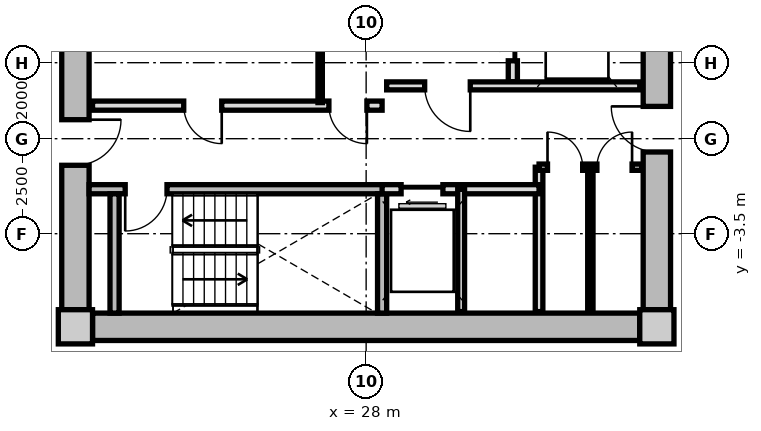
"""IFC4 building model, lengths in metres.
Left out: names, types, materials, properties, quantities, classifications, styles, units other than length and angle.
Written with IfcOpenShell. Run it as: python <this file> out.ifc"""

import sys

from ifc_helpers import new_model, si_unit, direction, frame, frame_2d, origin, origin_2d, place, context, subcontext, project, spatial, rectangle, extrude, source, transform, mapped, element, fill, save


model = new_model("IFC4")
c1 = context("Model", 3, precision=1e-05, world=origin(), true_north=direction((0.0, 1.0)))
c2 = subcontext(c1, "Body", "Model", "MODEL_VIEW")
j1 = project(units=[si_unit("LENGTHUNIT", "METRE"), si_unit("PLANEANGLEUNIT", "RADIAN")], contexts=[c1])
p1 = place(None, origin())
s1 = spatial("IfcSite", under=j1, at=p1, CompositionType="ELEMENT")
p2 = place(p1, origin())
s2 = spatial("IfcBuilding", under=s1, at=p2, CompositionType="ELEMENT")
p3 = place(p2, frame((0.0, 0.0, 105.4)))
s3 = spatial("IfcBuildingStorey", under=s2, at=p3, CompositionType="ELEMENT", Elevation=105.4)
m1 = source(origin(), c2, "Body", "SweptSolid", [
    extrude(rectangle(XDim=0.9, YDim=0.9, at=origin_2d()), origin(), (0.0, 0.0, 1.0), 3.05),
])
for number, where, z_axis, x_axis in (
    (1, (20.35, -5.95, 0.0), (0.0, 0.0, 1.0), (1.0, 0.0, 0.0)),
    (2, (35.65, -5.95, 0.0), (0.0, 0.0, 1.0), (1.0, 0.0, 0.0)),
):
    element("IfcColumn", number, at=place(p3, frame(where, z_axis=z_axis, x_axis=x_axis)), inside=s3, PredefinedType="COLUMN", context=c2, shape_type="MappedRepresentation", body=[
        mapped(m1, transform((0.0, 0.0, 0.0), x_axis=(1.0, 0.0, 0.0), y_axis=(0.0, 1.0, 0.0), z_axis=(0.0, 0.0, 1.0), scale=1.0)),
    ])
m2 = source(origin(), c2, "Body", "SweptSolid", [
    extrude(rectangle(XDim=14.4, YDim=0.72, at=frame_2d((7.2, 0.0))), origin(), (0.0, 0.0, 1.0), 2.79),
])
p4 = place(p3, frame((35.2, -5.95, 0.0), z_axis=(0.0, 0.0, 1.0), x_axis=(-1.0, 0.0, 0.0)))
e3 = element("IfcWall", 3, at=p4, inside=s3, PredefinedType="SHEAR", context=c2, shape_type="MappedRepresentation", body=[
    mapped(m2, transform((0.0, 0.0, 0.0), x_axis=(1.0, 0.0, 0.0), y_axis=(0.0, 1.0, 0.0), z_axis=(0.0, 0.0, 1.0), scale=1.0)),
])
m3 = source(origin(), c2, "Body", "SweptSolid", [
    extrude(rectangle(XDim=11.0, YDim=0.72, at=frame_2d((5.5, 0.0))), origin(), (0.0, 0.0, 1.0), 2.79),
])
p5 = place(p3, frame((20.35, -5.5, 0.0), z_axis=(0.0, 0.0, 1.0), x_axis=(0.0, 1.0, 0.0)))
e4 = element("IfcWall", 4, at=p5, inside=s3, PredefinedType="SHEAR", context=c2, shape_type="MappedRepresentation", body=[
    mapped(m3, transform((0.0, 0.0, 0.0), x_axis=(1.0, 0.0, 0.0), y_axis=(0.0, 1.0, 0.0), z_axis=(0.0, 0.0, 1.0), scale=1.0)),
])
p6 = place(p5, frame((3.8, 0.0, 0.0)))
e5 = element("IfcOpeningElement", 5, at=p6, cuts=e4, PredefinedType="OPENING", context=c2, shape_type="SweptSolid", body=[
    extrude(rectangle(XDim=1.2, YDim=2.15, at=frame_2d((0.6, 1.075))), frame((0.0, 0.37, 0.0), z_axis=(0.0, -1.0, 0.0), x_axis=(1.0, 0.0, 0.0)), (0.0, 0.0, 1.0), 0.74),
])
p7 = place(p3, frame((35.65, 5.5, 0.0), z_axis=(0.0, 0.0, 1.0), x_axis=(0.0, -1.0, 0.0)))
e6 = element("IfcWall", 6, at=p7, inside=s3, PredefinedType="SHEAR", context=c2, shape_type="MappedRepresentation", body=[
    mapped(m3, transform((0.0, 0.0, 0.0), x_axis=(1.0, 0.0, 0.0), y_axis=(0.0, 1.0, 0.0), z_axis=(0.0, 0.0, 1.0), scale=1.0)),
])
p8 = place(p7, frame((5.65, 0.0, 0.0)))
e7 = element("IfcOpeningElement", 7, at=p8, cuts=e6, PredefinedType="OPENING", context=c2, shape_type="SweptSolid", body=[
    extrude(rectangle(XDim=1.2, YDim=2.15, at=frame_2d((0.6, 1.075))), frame((0.0, 0.37, 0.0), z_axis=(0.0, -1.0, 0.0), x_axis=(1.0, 0.0, 0.0)), (0.0, 0.0, 1.0), 0.74),
])
m4 = source(origin(), c2, "Body", "SweptSolid", [
    extrude(rectangle(XDim=7.83, YDim=0.24, at=frame_2d((3.915, 0.0))), origin(), (0.0, 0.0, 1.0), 2.79),
])
p9 = place(p3, frame((20.71, -2.33, 0.0), z_axis=(0.0, 0.0, 1.0), x_axis=(1.0, 0.0, 0.0)))
e8 = element("IfcWall", 8, at=p9, inside=s3, PredefinedType="PARTITIONING", context=c2, shape_type="MappedRepresentation", body=[
    mapped(m4, transform((0.0, 0.0, 0.0), x_axis=(1.0, 0.0, 0.0), y_axis=(0.0, 1.0, 0.0), z_axis=(0.0, 0.0, 1.0), scale=1.0)),
])
p10 = place(p9, frame((0.95, 0.0, 0.0)))
e9 = element("IfcOpeningElement", 9, at=p10, cuts=e8, PredefinedType="OPENING", context=c2, shape_type="SweptSolid", body=[
    extrude(rectangle(XDim=1.1, YDim=2.15, at=frame_2d((0.55, 1.075))), frame((0.0, 0.13, 0.0), z_axis=(0.0, -1.0, 0.0), x_axis=(1.0, 0.0, 0.0)), (0.0, 0.0, 1.0), 0.26),
])
m5 = source(origin(), c2, "Body", "SweptSolid", [
    extrude(rectangle(XDim=3.14, YDim=0.24, at=frame_2d((1.57, 0.0))), origin(), (0.0, 0.0, 1.0), 2.79),
])
for number, where, z_axis, x_axis in (
    (10, (21.38, -5.59, 0.0), (0.0, 0.0, 1.0), (0.0, 1.0, 0.0)),
    (11, (28.42, -5.59, 0.0), (0.0, 0.0, 1.0), (0.0, 1.0, 0.0)),
):
    element("IfcWall", number, at=place(p3, frame(where, z_axis=z_axis, x_axis=x_axis)), inside=s3, PredefinedType="PARTITIONING", context=c2, shape_type="MappedRepresentation", body=[
        mapped(m5, transform((0.0, 0.0, 0.0), x_axis=(1.0, 0.0, 0.0), y_axis=(0.0, 1.0, 0.0), z_axis=(0.0, 0.0, 1.0), scale=1.0)),
    ])
m6 = source(origin(), c2, "Body", "SweptSolid", [
    extrude(rectangle(XDim=5.0, YDim=0.24, at=frame_2d((2.5, 0.0))), origin(), (0.0, 0.0, 1.0), 2.775),
])
p11 = place(p3, frame((31.86, 0.5, 0.0), z_axis=(0.0, 0.0, 1.0), x_axis=(0.0, 1.0, 0.0)))
e12 = element("IfcWall", 12, at=p11, inside=s3, PredefinedType="PARTITIONING", context=c2, shape_type="MappedRepresentation", body=[
    mapped(m6, transform((0.0, 0.0, 0.0), x_axis=(1.0, 0.0, 0.0), y_axis=(0.0, 1.0, 0.0), z_axis=(0.0, 0.0, 1.0), scale=1.0)),
])
p12 = place(p11, frame((3.05, 0.0, 0.0)))
e13 = element("IfcOpeningElement", 13, at=p12, cuts=e12, PredefinedType="OPENING", context=c2, shape_type="SweptSolid", body=[
    extrude(rectangle(XDim=1.3, YDim=2.2, at=frame_2d((0.65, 1.1))), frame((0.0, 0.13, 0.0), z_axis=(0.0, -1.0, 0.0), x_axis=(1.0, 0.0, 0.0)), (0.0, 0.0, 1.0), 0.26),
])
p13 = place(p11, frame((0.55, 0.0, 0.0)))
e14 = element("IfcOpeningElement", 14, at=p13, cuts=e12, PredefinedType="OPENING", context=c2, shape_type="SweptSolid", body=[
    extrude(rectangle(XDim=1.3, YDim=2.2, at=frame_2d((0.65, 1.1))), frame((0.0, 0.13, 0.0), z_axis=(0.0, -1.0, 0.0), x_axis=(1.0, 0.0, 0.0)), (0.0, 0.0, 1.0), 0.26),
])
m7 = source(origin(), c2, "Body", "SweptSolid", [
    extrude(rectangle(XDim=6.66, YDim=0.21, at=frame_2d((3.33, 0.0))), origin(), (0.0, 0.0, 1.0), 2.775),
])
p14 = place(p3, frame((28.54, 0.39, 0.0), z_axis=(0.0, 0.0, 1.0), x_axis=(1.0, 0.0, 0.0)))
e15 = element("IfcWall", 15, at=p14, inside=s3, PredefinedType="PARTITIONING", context=c2, shape_type="MappedRepresentation", body=[
    mapped(m7, transform((0.0, 0.0, 0.0), x_axis=(1.0, 0.0, 0.0), y_axis=(0.0, 1.0, 0.0), z_axis=(0.0, 0.0, 1.0), scale=1.0)),
])
p15 = place(p14, frame((1.0, 0.0, 0.0)))
e16 = element("IfcOpeningElement", 16, at=p15, cuts=e15, PredefinedType="OPENING", context=c2, shape_type="SweptSolid", body=[
    extrude(rectangle(XDim=1.2, YDim=2.15, at=frame_2d((0.6, 1.075))), frame((0.0, 0.115, 0.0), z_axis=(0.0, -1.0, 0.0), x_axis=(1.0, 0.0, 0.0)), (0.0, 0.0, 1.0), 0.23),
])
m8 = source(origin(), c2, "Body", "SweptSolid", [
    extrude(rectangle(XDim=7.62, YDim=0.24, at=frame_2d((3.81, 0.0))), origin(), (0.0, 0.0, 1.0), 2.775),
])
p16 = place(p3, frame((20.8, -0.13, 0.0), z_axis=(0.0, 0.0, 1.0), x_axis=(1.0, 0.0, 0.0)))
e17 = element("IfcWall", 17, at=p16, inside=s3, PredefinedType="PARTITIONING", context=c2, shape_type="MappedRepresentation", body=[
    mapped(m8, transform((0.0, 0.0, 0.0), x_axis=(1.0, 0.0, 0.0), y_axis=(0.0, 1.0, 0.0), z_axis=(0.0, 0.0, 1.0), scale=1.0)),
])
p17 = place(p16, frame((6.22, 0.0, 0.0)))
e18 = element("IfcOpeningElement", 18, at=p17, cuts=e17, PredefinedType="OPENING", context=c2, shape_type="SweptSolid", body=[
    extrude(rectangle(XDim=1.0, YDim=2.1, at=frame_2d((0.5, 1.05))), frame((0.0, 0.13, 0.0), z_axis=(0.0, -1.0, 0.0), x_axis=(1.0, 0.0, 0.0)), (0.0, 0.0, 1.0), 0.26),
])
p18 = place(p16, frame((2.4, 0.0, 0.0)))
e19 = element("IfcOpeningElement", 19, at=p18, cuts=e17, PredefinedType="OPENING", context=c2, shape_type="SweptSolid", body=[
    extrude(rectangle(XDim=1.0, YDim=2.1, at=frame_2d((0.5, 1.05))), frame((0.0, 0.13, 0.0), z_axis=(0.0, -1.0, 0.0), x_axis=(1.0, 0.0, 0.0)), (0.0, 0.0, 1.0), 0.26),
])
m9 = source(origin(), c2, "Body", "SweptSolid", [
    extrude(rectangle(XDim=2.33, YDim=0.115, at=frame_2d((1.165, 0.0))), origin(), (0.0, 0.0, 1.0), 2.775),
])
p19 = place(p3, frame((26.79, -0.05, 0.0), z_axis=(0.0, 0.0, 1.0), x_axis=(0.0, 1.0, 0.0)))
e20 = element("IfcWall", 20, at=p19, inside=s3, PredefinedType="PARTITIONING", context=c2, shape_type="MappedRepresentation", body=[
    mapped(m9, transform((0.0, 0.0, 0.0), x_axis=(1.0, 0.0, 0.0), y_axis=(0.0, 1.0, 0.0), z_axis=(0.0, 0.0, 1.0), scale=1.0)),
])
m10 = source(origin(), c2, "Body", "SweptSolid", [
    extrude(rectangle(XDim=3.8, YDim=0.2, at=frame_2d((1.9, 0.0))), origin(), (0.0, 0.0, 1.0), 2.775),
])
p20 = place(p3, frame((32.55, -5.55, 0.0), z_axis=(0.0, 0.0, 1.0), x_axis=(0.0, 1.0, 0.0)))
e21 = element("IfcWall", 21, at=p20, inside=s3, PredefinedType="PARTITIONING", context=c2, shape_type="MappedRepresentation", body=[
    mapped(m10, transform((0.0, 0.0, 0.0), x_axis=(1.0, 0.0, 0.0), y_axis=(0.0, 1.0, 0.0), z_axis=(0.0, 0.0, 1.0), scale=1.0)),
])
m11 = source(origin(), c2, "Body", "SweptSolid", [
    extrude(rectangle(XDim=4.13, YDim=0.24, at=frame_2d((2.065, 0.0))), origin(), (0.0, 0.0, 1.0), 2.775),
])
p21 = place(p3, frame((28.42, -2.33, 0.0), z_axis=(0.0, 0.0, 1.0), x_axis=(1.0, 0.0, 0.0)))
e22 = element("IfcWall", 22, at=p21, inside=s3, PredefinedType="PARTITIONING", context=c2, shape_type="MappedRepresentation", body=[
    mapped(m11, transform((0.0, 0.0, 0.0), x_axis=(1.0, 0.0, 0.0), y_axis=(0.0, 1.0, 0.0), z_axis=(0.0, 0.0, 1.0), scale=1.0)),
])
p22 = place(p21, frame((0.5, 0.0, 0.0)))
e23 = element("IfcOpeningElement", 23, at=p22, cuts=e22, PredefinedType="OPENING", context=c2, shape_type="SweptSolid", body=[
    extrude(rectangle(XDim=1.1, YDim=2.2, at=frame_2d((0.55, 1.1))), frame((0.0, 0.13, 0.0), z_axis=(0.0, -1.0, 0.0), x_axis=(1.0, 0.0, 0.0)), (0.0, 0.0, 1.0), 0.26),
])
m12 = source(origin(), c2, "Body", "SweptSolid", [
    extrude(rectangle(XDim=3.22, YDim=0.18, at=frame_2d((1.61, 0.0))), origin(), (0.0, 0.0, 1.0), 2.775),
])
p23 = place(p3, frame((30.5, -5.55, 0.0), z_axis=(0.0, 0.0, 1.0), x_axis=(0.0, 1.0, 0.0)))
e24 = element("IfcWall", 24, at=p23, inside=s3, PredefinedType="PARTITIONING", context=c2, shape_type="MappedRepresentation", body=[
    mapped(m12, transform((0.0, 0.0, 0.0), x_axis=(1.0, 0.0, 0.0), y_axis=(0.0, 1.0, 0.0), z_axis=(0.0, 0.0, 1.0), scale=1.0)),
])
m13 = source(origin(), c2, "Body", "SweptSolid", [
    extrude(rectangle(XDim=2.7, YDim=0.165, at=frame_2d((1.35, 0.0))), origin(), (0.0, 0.0, 1.0), 2.775),
])
p24 = place(p3, frame((32.55, -1.75, 0.0), z_axis=(0.0, 0.0, 1.0), x_axis=(1.0, 0.0, 0.0)))
e25 = element("IfcWall", 25, at=p24, inside=s3, PredefinedType="PARTITIONING", context=c2, shape_type="MappedRepresentation", body=[
    mapped(m13, transform((0.0, 0.0, 0.0), x_axis=(1.0, 0.0, 0.0), y_axis=(0.0, 1.0, 0.0), z_axis=(0.0, 0.0, 1.0), scale=1.0)),
])
p25 = place(p24, frame((0.222, 0.0, 0.0)))
e26 = element("IfcOpeningElement", 26, at=p25, cuts=e25, PredefinedType="OPENING", context=c2, shape_type="SweptSolid", body=[
    extrude(rectangle(XDim=0.925, YDim=2.1, at=frame_2d((0.462, 1.05))), frame((0.0, 0.093, 0.0), z_axis=(0.0, -1.0, 0.0), x_axis=(1.0, 0.0, 0.0)), (0.0, 0.0, 1.0), 0.185),
])
p26 = place(p24, frame((1.522, 0.0, 0.0)))
e27 = element("IfcOpeningElement", 27, at=p26, cuts=e25, PredefinedType="OPENING", context=c2, shape_type="SweptSolid", body=[
    extrude(rectangle(XDim=0.925, YDim=2.1, at=frame_2d((0.462, 1.05))), frame((0.0, 0.093, 0.0), z_axis=(0.0, -1.0, 0.0), x_axis=(1.0, 0.0, 0.0)), (0.0, 0.0, 1.0), 0.185),
])
m14 = source(origin(), c2, "Body", "SweptSolid", [
    extrude(rectangle(XDim=3.8, YDim=0.14, at=frame_2d((1.9, 0.0))), origin(), (0.0, 0.0, 1.0), 2.775),
])
p27 = place(p3, frame((33.9, -5.55, 0.0), z_axis=(0.0, 0.0, 1.0), x_axis=(0.0, 1.0, 0.0)))
e28 = element("IfcWall", 28, at=p27, inside=s3, PredefinedType="PARTITIONING", context=c2, shape_type="MappedRepresentation", body=[
    mapped(m14, transform((0.0, 0.0, 0.0), x_axis=(1.0, 0.0, 0.0), y_axis=(0.0, 1.0, 0.0), z_axis=(0.0, 0.0, 1.0), scale=1.0)),
])
m15 = source(origin(), c2, "Body", "SweptSolid", [
    extrude(rectangle(XDim=1.1, YDim=2.15, at=frame_2d((0.55, 1.075))), frame((0.0, 0.025, 0.0), z_axis=(0.0, -1.0, 0.0), x_axis=(1.0, 0.0, 0.0)), (0.0, 0.0, 1.0), 0.05),
])
p28 = place(p10, frame((1.1, 0.0, 0.0), z_axis=(0.0, 0.0, 1.0), x_axis=(-1.0, 0.0, 0.0)))
e29 = element("IfcDoor", 29, at=p28, inside=s3, OperationType="SINGLE_SWING_RIGHT", PredefinedType="DOOR", context=c2, shape_type="MappedRepresentation", body=[
    mapped(m15, transform((0.0, 0.0, 0.0), x_axis=(1.0, 0.0, 0.0), y_axis=(0.0, 1.0, 0.0), z_axis=(0.0, 0.0, 1.0), scale=1.0)),
])
fill(e9, e29)
m16 = source(origin(), c2, "Body", "SweptSolid", [
    extrude(rectangle(XDim=1.3, YDim=2.2, at=frame_2d((0.65, 1.1))), frame((0.0, 0.025, 0.0), z_axis=(0.0, -1.0, 0.0), x_axis=(1.0, 0.0, 0.0)), (0.0, 0.0, 1.0), 0.05),
])
p29 = place(p13, origin())
e30 = element("IfcDoor", 30, at=p29, inside=s3, OperationType="SLIDING_TO_RIGHT", PredefinedType="DOOR", context=c2, shape_type="MappedRepresentation", body=[
    mapped(m16, transform((0.0, 0.0, 0.0), x_axis=(1.0, 0.0, 0.0), y_axis=(0.0, 1.0, 0.0), z_axis=(0.0, 0.0, 1.0), scale=1.0)),
])
fill(e14, e30)
m17 = source(origin(), c2, "Body", "SweptSolid", [
    extrude(rectangle(XDim=1.2, YDim=2.15, at=frame_2d((0.6, 1.075))), frame((0.0, 0.025, 0.0), z_axis=(0.0, -1.0, 0.0), x_axis=(1.0, 0.0, 0.0)), (0.0, 0.0, 1.0), 0.05),
])
p30 = place(p15, frame((1.2, 0.0, 0.0), z_axis=(0.0, 0.0, 1.0), x_axis=(-1.0, 0.0, 0.0)))
e31 = element("IfcDoor", 31, at=p30, inside=s3, OperationType="SINGLE_SWING_LEFT", PredefinedType="DOOR", context=c2, shape_type="MappedRepresentation", body=[
    mapped(m17, transform((0.0, 0.0, 0.0), x_axis=(1.0, 0.0, 0.0), y_axis=(0.0, 1.0, 0.0), z_axis=(0.0, 0.0, 1.0), scale=1.0)),
])
fill(e16, e31)
p31 = place(p6, frame((1.2, 0.0, 0.0), z_axis=(0.0, 0.0, 1.0), x_axis=(-1.0, 0.0, 0.0)))
e32 = element("IfcDoor", 32, at=p31, inside=s3, OperationType="SINGLE_SWING_LEFT", PredefinedType="DOOR", context=c2, shape_type="MappedRepresentation", body=[
    mapped(m17, transform((0.0, 0.0, 0.0), x_axis=(1.0, 0.0, 0.0), y_axis=(0.0, 1.0, 0.0), z_axis=(0.0, 0.0, 1.0), scale=1.0)),
])
fill(e5, e32)
p32 = place(p8, frame((1.2, 0.0, 0.0), z_axis=(0.0, 0.0, 1.0), x_axis=(-1.0, 0.0, 0.0)))
e33 = element("IfcDoor", 33, at=p32, inside=s3, OperationType="SINGLE_SWING_RIGHT", PredefinedType="DOOR", context=c2, shape_type="MappedRepresentation", body=[
    mapped(m17, transform((0.0, 0.0, 0.0), x_axis=(1.0, 0.0, 0.0), y_axis=(0.0, 1.0, 0.0), z_axis=(0.0, 0.0, 1.0), scale=1.0)),
])
fill(e7, e33)
m18 = source(origin(), c2, "Body", "SweptSolid", [
    extrude(rectangle(XDim=1.0, YDim=2.1, at=frame_2d((0.5, 1.05))), frame((0.0, 0.025, 0.0), z_axis=(0.0, -1.0, 0.0), x_axis=(1.0, 0.0, 0.0)), (0.0, 0.0, 1.0), 0.05),
])
p33 = place(p17, frame((1.0, 0.0, 0.0), z_axis=(0.0, 0.0, 1.0), x_axis=(-1.0, 0.0, 0.0)))
e34 = element("IfcDoor", 34, at=p33, inside=s3, OperationType="SINGLE_SWING_LEFT", PredefinedType="DOOR", context=c2, shape_type="MappedRepresentation", body=[
    mapped(m18, transform((0.0, 0.0, 0.0), x_axis=(1.0, 0.0, 0.0), y_axis=(0.0, 1.0, 0.0), z_axis=(0.0, 0.0, 1.0), scale=1.0)),
])
fill(e18, e34)
p34 = place(p18, frame((1.0, 0.0, 0.0), z_axis=(0.0, 0.0, 1.0), x_axis=(-1.0, 0.0, 0.0)))
e35 = element("IfcDoor", 35, at=p34, inside=s3, OperationType="SINGLE_SWING_LEFT", PredefinedType="DOOR", context=c2, shape_type="MappedRepresentation", body=[
    mapped(m18, transform((0.0, 0.0, 0.0), x_axis=(1.0, 0.0, 0.0), y_axis=(0.0, 1.0, 0.0), z_axis=(0.0, 0.0, 1.0), scale=1.0)),
])
fill(e19, e35)
m19 = source(origin(), c2, "Body", "SweptSolid", [
    extrude(rectangle(XDim=1.1, YDim=2.2, at=frame_2d((0.55, 1.1))), frame((0.0, 0.025, 0.0), z_axis=(0.0, -1.0, 0.0), x_axis=(1.0, 0.0, 0.0)), (0.0, 0.0, 1.0), 0.05),
])
p35 = place(p22, frame((1.1, 0.0, 0.0), z_axis=(0.0, 0.0, 1.0), x_axis=(-1.0, 0.0, 0.0)))
e36 = element("IfcDoor", 36, at=p35, inside=s3, OperationType="SLIDING_TO_LEFT", PredefinedType="DOOR", context=c2, shape_type="MappedRepresentation", body=[
    mapped(m19, transform((0.0, 0.0, 0.0), x_axis=(1.0, 0.0, 0.0), y_axis=(0.0, 1.0, 0.0), z_axis=(0.0, 0.0, 1.0), scale=1.0)),
])
fill(e23, e36)
m20 = source(origin(), c2, "Body", "SweptSolid", [
    extrude(rectangle(XDim=0.925, YDim=2.1, at=frame_2d((0.462, 1.05))), frame((0.0, 0.025, 0.0), z_axis=(0.0, -1.0, 0.0), x_axis=(1.0, 0.0, 0.0)), (0.0, 0.0, 1.0), 0.05),
])
p36 = place(p25, origin())
e37 = element("IfcDoor", 37, at=p36, inside=s3, OperationType="SINGLE_SWING_LEFT", PredefinedType="DOOR", context=c2, shape_type="MappedRepresentation", body=[
    mapped(m20, transform((0.0, 0.0, 0.0), x_axis=(1.0, 0.0, 0.0), y_axis=(0.0, 1.0, 0.0), z_axis=(0.0, 0.0, 1.0), scale=1.0)),
])
fill(e26, e37)
p37 = place(p26, origin())
e38 = element("IfcDoor", 38, at=p37, inside=s3, OperationType="SINGLE_SWING_RIGHT", PredefinedType="DOOR", context=c2, shape_type="MappedRepresentation", body=[
    mapped(m20, transform((0.0, 0.0, 0.0), x_axis=(1.0, 0.0, 0.0), y_axis=(0.0, 1.0, 0.0), z_axis=(0.0, 0.0, 1.0), scale=1.0)),
])
fill(e27, e38)
save(model, sys.argv[1])
